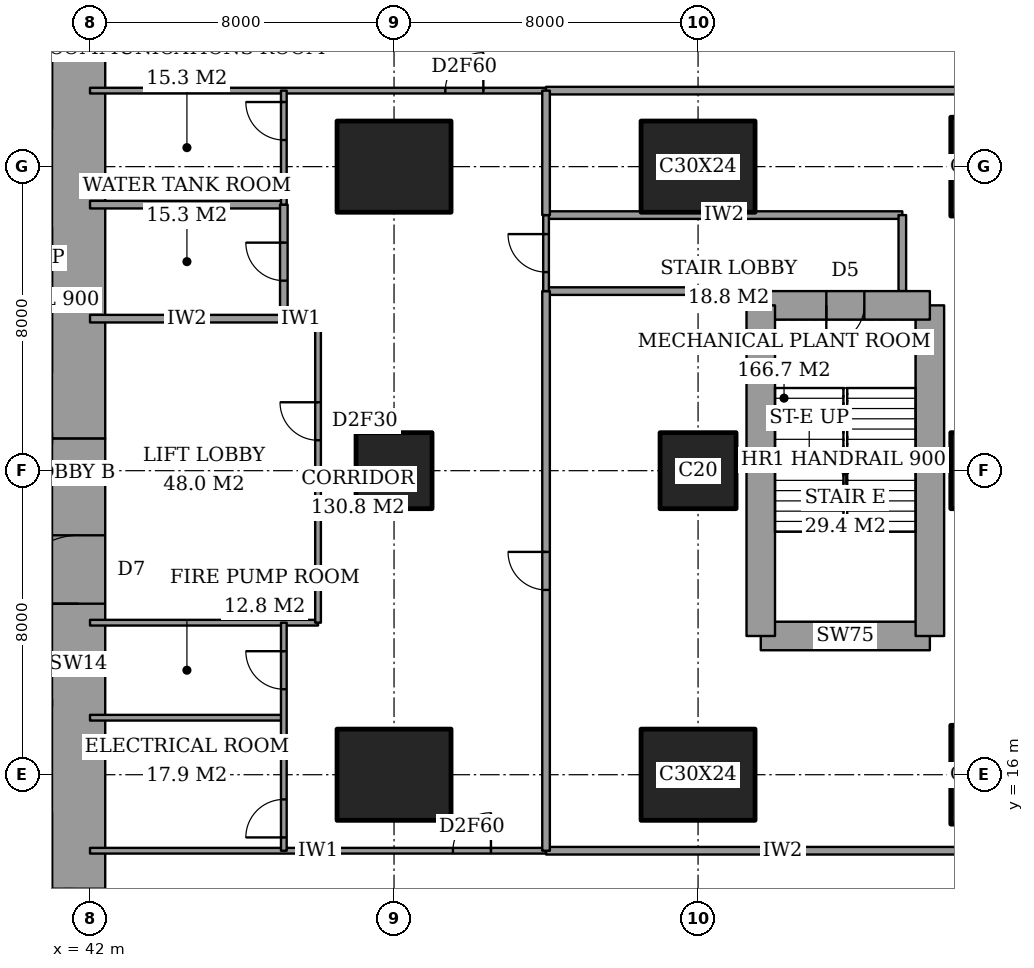
"""IFC4 building model, lengths in metres.
Left out: names, types, materials, properties, quantities, classifications, styles, units other than length and angle.
Written with IfcOpenShell. Run it as: python <this file> out.ifc"""

import sys

from ifc_helpers import new_model, si_unit, direction, frame, frame_2d, origin, origin_2d, place, context, subcontext, project, spatial, rectangle, extrude, element, fill, save


model = new_model("IFC4")
c1 = context("Model", 3, precision=1e-05, world=origin(), true_north=direction((0.0, 1.0)))
c2 = subcontext(c1, "Body", "Model", "MODEL_VIEW")
j1 = project(units=[si_unit("LENGTHUNIT", "METRE"), si_unit("PLANEANGLEUNIT", "RADIAN")], contexts=[c1])
p1 = place(None, origin())
s1 = spatial("IfcSite", under=j1, at=p1, CompositionType="ELEMENT")
p2 = place(p1, origin())
s2 = spatial("IfcBuilding", under=s1, at=p2, CompositionType="ELEMENT")
p3 = place(p2, frame((0.0, 0.0, 90.8)))
s3 = spatial("IfcBuildingStorey", under=s2, at=p3, CompositionType="ELEMENT", Elevation=90.8)
p4 = place(p3, frame((50.0, 16.0, 0.0), z_axis=(0.0, 0.0, 1.0), x_axis=(1.0, 0.0, 0.0)))
e1 = element("IfcColumn", 1, at=p4, inside=s3, PredefinedType="COLUMN", context=c2, shape_type="SweptSolid", body=[
    extrude(rectangle(XDim=3.0, YDim=2.4, at=origin_2d()), origin(), (0.0, 0.0, 1.0), 5.4),
])
p5 = place(p3, frame((50.0, 24.0, 0.0), z_axis=(0.0, 0.0, 1.0), x_axis=(1.0, 0.0, 0.0)))
e2 = element("IfcColumn", 2, at=p5, inside=s3, PredefinedType="COLUMN", context=c2, shape_type="SweptSolid", body=[
    extrude(rectangle(XDim=2.0, YDim=2.0, at=origin_2d()), origin(), (0.0, 0.0, 1.0), 5.4),
])
for number, where, z_axis, x_axis in (
    (3, (50.0, 32.0, 0.0), (0.0, 0.0, 1.0), (1.0, 0.0, 0.0)),
    (4, (58.0, 16.0, 0.0), (0.0, 0.0, 1.0), (1.0, 0.0, 0.0)),
):
    element("IfcColumn", number, at=place(p3, frame(where, z_axis=z_axis, x_axis=x_axis)), inside=s3, PredefinedType="COLUMN", context=c2, shape_type="SweptSolid", body=[
        extrude(rectangle(XDim=3.0, YDim=2.4, at=origin_2d()), origin(), (0.0, 0.0, 1.0), 5.4),
    ])
p6 = place(p3, frame((58.0, 24.0, 0.0), z_axis=(0.0, 0.0, 1.0), x_axis=(1.0, 0.0, 0.0)))
e5 = element("IfcColumn", 5, at=p6, inside=s3, PredefinedType="COLUMN", context=c2, shape_type="SweptSolid", body=[
    extrude(rectangle(XDim=2.0, YDim=2.0, at=origin_2d()), origin(), (0.0, 0.0, 1.0), 5.4),
])
p7 = place(p3, frame((58.0, 32.0, 0.0), z_axis=(0.0, 0.0, 1.0), x_axis=(1.0, 0.0, 0.0)))
e6 = element("IfcColumn", 6, at=p7, inside=s3, PredefinedType="COLUMN", context=c2, shape_type="SweptSolid", body=[
    extrude(rectangle(XDim=3.0, YDim=2.4, at=origin_2d()), origin(), (0.0, 0.0, 1.0), 5.4),
])
p8 = place(p3, frame((65.65, 16.0, 0.0), z_axis=(0.0, 0.0, 1.0), x_axis=(0.0, 1.0, 0.0)))
e7 = element("IfcColumn", 7, at=p8, inside=s3, PredefinedType="COLUMN", context=c2, shape_type="SweptSolid", body=[
    extrude(rectangle(XDim=2.6, YDim=2.0, at=origin_2d()), origin(), (0.0, 0.0, 1.0), 5.4),
])
p9 = place(p3, frame((65.65, 24.0, 0.0), z_axis=(0.0, 0.0, 1.0), x_axis=(1.0, 0.0, 0.0)))
e8 = element("IfcColumn", 8, at=p9, inside=s3, PredefinedType="COLUMN", context=c2, shape_type="SweptSolid", body=[
    extrude(rectangle(XDim=2.0, YDim=2.0, at=origin_2d()), origin(), (0.0, 0.0, 1.0), 5.4),
])
p10 = place(p3, frame((65.65, 32.0, 0.0), z_axis=(0.0, 0.0, 1.0), x_axis=(0.0, 1.0, 0.0)))
e9 = element("IfcColumn", 9, at=p10, inside=s3, PredefinedType="COLUMN", context=c2, shape_type="SweptSolid", body=[
    extrude(rectangle(XDim=2.6, YDim=2.0, at=origin_2d()), origin(), (0.0, 0.0, 1.0), 5.4),
])
p11 = place(p3, frame((41.7, 13.0, 0.0), z_axis=(0.0, 0.0, 1.0), x_axis=(0.0, 1.0, 0.0)))
e10 = element("IfcWall", 10, at=p11, inside=s3, PredefinedType="SHEAR", context=c2, shape_type="SweptSolid", body=[
    extrude(rectangle(XDim=11.85, YDim=1.4, at=frame_2d((5.925, 0.0))), origin(), (0.0, 0.0, 1.0), 5.4),
])
p12 = place(p11, frame((7.5, 0.0, 0.0)))
e11 = element("IfcOpeningElement", 11, at=p12, cuts=e10, PredefinedType="OPENING", context=c2, shape_type="SweptSolid", body=[
    extrude(rectangle(XDim=1.8, YDim=2.4, at=frame_2d((0.9, 1.2))), frame((0.0, 0.71, 0.0), z_axis=(0.0, -1.0, 0.0), x_axis=(1.0, 0.0, 0.0)), (0.0, 0.0, 1.0), 1.42),
])
p13 = place(p3, frame((41.7, 24.85, 0.0), z_axis=(0.0, 0.0, 1.0), x_axis=(0.0, 1.0, 0.0)))
e12 = element("IfcWall", 12, at=p13, inside=s3, PredefinedType="SHEAR", context=c2, shape_type="SweptSolid", body=[
    extrude(rectangle(XDim=10.15, YDim=1.4, at=frame_2d((5.075, 0.0))), origin(), (0.0, 0.0, 1.0), 5.4),
])
p14 = place(p3, frame((59.65, 19.65, 0.0), z_axis=(0.0, 0.0, 1.0), x_axis=(1.0, 0.0, 0.0)))
e13 = element("IfcWall", 13, at=p14, inside=s3, PredefinedType="SHEAR", context=c2, shape_type="SweptSolid", body=[
    extrude(rectangle(XDim=4.45, YDim=0.75, at=frame_2d((2.225, 0.0))), origin(), (0.0, 0.0, 1.0), 5.4),
])
p15 = place(p3, frame((64.1, 19.65, 0.0), z_axis=(0.0, 0.0, 1.0), x_axis=(0.0, 1.0, 0.0)))
e14 = element("IfcWall", 14, at=p15, inside=s3, PredefinedType="SHEAR", context=c2, shape_type="SweptSolid", body=[
    extrude(rectangle(XDim=8.7, YDim=0.75, at=frame_2d((4.35, 0.0))), origin(), (0.0, 0.0, 1.0), 5.4),
])
p16 = place(p3, frame((64.1, 28.35, 0.0), z_axis=(0.0, 0.0, 1.0), x_axis=(-1.0, 0.0, 0.0)))
e15 = element("IfcWall", 15, at=p16, inside=s3, PredefinedType="SHEAR", context=c2, shape_type="SweptSolid", body=[
    extrude(rectangle(XDim=4.45, YDim=0.75, at=frame_2d((2.225, 0.0))), origin(), (0.0, 0.0, 1.0), 5.4),
])
p17 = place(p16, frame((1.725, 0.0, 0.0)))
e16 = element("IfcOpeningElement", 16, at=p17, cuts=e15, PredefinedType="OPENING", context=c2, shape_type="SweptSolid", body=[
    extrude(rectangle(XDim=1.0, YDim=2.1, at=frame_2d((0.5, 1.05))), frame((0.0, 0.385, 0.0), z_axis=(0.0, -1.0, 0.0), x_axis=(1.0, 0.0, 0.0)), (0.0, 0.0, 1.0), 0.77),
])
p18 = place(p3, frame((59.65, 28.35, 0.0), z_axis=(0.0, 0.0, 1.0), x_axis=(0.0, -1.0, 0.0)))
e17 = element("IfcWall", 17, at=p18, inside=s3, PredefinedType="SHEAR", context=c2, shape_type="SweptSolid", body=[
    extrude(rectangle(XDim=8.7, YDim=0.75, at=frame_2d((4.35, 0.0))), origin(), (0.0, 0.0, 1.0), 5.4),
])
p19 = place(p3, frame((54.0, 14.0, 0.0), z_axis=(0.0, 0.0, 1.0), x_axis=(1.0, 0.0, 0.0)))
e18 = element("IfcWall", 18, at=p19, inside=s3, PredefinedType="PARTITIONING", context=c2, shape_type="SweptSolid", body=[
    extrude(rectangle(XDim=12.45, YDim=0.2, at=frame_2d((6.225, 0.0))), origin(), (0.0, 0.0, 1.0), 5.15),
])
p20 = place(p3, frame((42.0, 14.0, 0.0), z_axis=(0.0, 0.0, 1.0), x_axis=(1.0, 0.0, 0.0)))
e19 = element("IfcWall", 19, at=p20, inside=s3, PredefinedType="PARTITIONING", context=c2, shape_type="SweptSolid", body=[
    extrude(rectangle(XDim=12.0, YDim=0.15, at=frame_2d((6.0, 0.0))), origin(), (0.0, 0.0, 1.0), 5.15),
])
p21 = place(p20, frame((9.55, 0.0, 0.0)))
e20 = element("IfcOpeningElement", 20, at=p21, cuts=e19, PredefinedType="OPENING", context=c2, shape_type="SweptSolid", body=[
    extrude(rectangle(XDim=1.0, YDim=2.1, at=frame_2d((0.5, 1.05))), frame((0.0, 0.085, 0.0), z_axis=(0.0, -1.0, 0.0), x_axis=(1.0, 0.0, 0.0)), (0.0, 0.0, 1.0), 0.17),
])
p22 = place(p3, frame((42.0, 17.5, 0.0), z_axis=(0.0, 0.0, 1.0), x_axis=(1.0, 0.0, 0.0)))
e21 = element("IfcWall", 21, at=p22, inside=s3, PredefinedType="PARTITIONING", context=c2, shape_type="SweptSolid", body=[
    extrude(rectangle(XDim=5.1, YDim=0.15, at=frame_2d((2.55, 0.0))), origin(), (0.0, 0.0, 1.0), 5.15),
])
p23 = place(p3, frame((42.0, 20.0, 0.0), z_axis=(0.0, 0.0, 1.0), x_axis=(1.0, 0.0, 0.0)))
e22 = element("IfcWall", 22, at=p23, inside=s3, PredefinedType="PARTITIONING", context=c2, shape_type="SweptSolid", body=[
    extrude(rectangle(XDim=6.0, YDim=0.15, at=frame_2d((3.0, 0.0))), origin(), (0.0, 0.0, 1.0), 5.15),
])
p24 = place(p3, frame((42.0, 28.0, 0.0), z_axis=(0.0, 0.0, 1.0), x_axis=(1.0, 0.0, 0.0)))
e23 = element("IfcWall", 23, at=p24, inside=s3, PredefinedType="PARTITIONING", context=c2, shape_type="SweptSolid", body=[
    extrude(rectangle(XDim=5.1, YDim=0.2, at=frame_2d((2.55, 0.0))), origin(), (0.0, 0.0, 1.0), 5.15),
])
p25 = place(p3, frame((47.1, 28.0, 0.0), z_axis=(0.0, 0.0, 1.0), x_axis=(1.0, 0.0, 0.0)))
e24 = element("IfcWall", 24, at=p25, inside=s3, PredefinedType="PARTITIONING", context=c2, shape_type="SweptSolid", body=[
    extrude(rectangle(XDim=0.9, YDim=0.15, at=frame_2d((0.45, 0.0))), origin(), (0.0, 0.0, 1.0), 5.15),
])
p26 = place(p3, frame((54.0, 28.725, 0.0), z_axis=(0.0, 0.0, 1.0), x_axis=(1.0, 0.0, 0.0)))
e25 = element("IfcWall", 25, at=p26, inside=s3, PredefinedType="PARTITIONING", context=c2, shape_type="SweptSolid", body=[
    extrude(rectangle(XDim=5.65, YDim=0.2, at=frame_2d((2.825, 0.0))), origin(), (0.0, 0.0, 1.0), 5.15),
])
p27 = place(p3, frame((54.0, 30.725, 0.0), z_axis=(0.0, 0.0, 1.0), x_axis=(1.0, 0.0, 0.0)))
e26 = element("IfcWall", 26, at=p27, inside=s3, PredefinedType="PARTITIONING", context=c2, shape_type="SweptSolid", body=[
    extrude(rectangle(XDim=9.375, YDim=0.2, at=frame_2d((4.688, 0.0))), origin(), (0.0, 0.0, 1.0), 5.15),
])
p28 = place(p3, frame((42.0, 31.0, 0.0), z_axis=(0.0, 0.0, 1.0), x_axis=(1.0, 0.0, 0.0)))
e27 = element("IfcWall", 27, at=p28, inside=s3, PredefinedType="PARTITIONING", context=c2, shape_type="SweptSolid", body=[
    extrude(rectangle(XDim=5.1, YDim=0.2, at=frame_2d((2.55, 0.0))), origin(), (0.0, 0.0, 1.0), 5.15),
])
p29 = place(p3, frame((54.0, 34.0, 0.0), z_axis=(0.0, 0.0, 1.0), x_axis=(1.0, 0.0, 0.0)))
e28 = element("IfcWall", 28, at=p29, inside=s3, PredefinedType="PARTITIONING", context=c2, shape_type="SweptSolid", body=[
    extrude(rectangle(XDim=12.45, YDim=0.2, at=frame_2d((6.225, 0.0))), origin(), (0.0, 0.0, 1.0), 5.15),
])
p30 = place(p3, frame((42.0, 34.0, 0.0), z_axis=(0.0, 0.0, 1.0), x_axis=(1.0, 0.0, 0.0)))
e29 = element("IfcWall", 29, at=p30, inside=s3, PredefinedType="PARTITIONING", context=c2, shape_type="SweptSolid", body=[
    extrude(rectangle(XDim=12.0, YDim=0.15, at=frame_2d((6.0, 0.0))), origin(), (0.0, 0.0, 1.0), 5.15),
])
p31 = place(p30, frame((9.35, 0.0, 0.0)))
e30 = element("IfcOpeningElement", 30, at=p31, cuts=e29, PredefinedType="OPENING", context=c2, shape_type="SweptSolid", body=[
    extrude(rectangle(XDim=1.0, YDim=2.1, at=frame_2d((0.5, 1.05))), frame((0.0, 0.085, 0.0), z_axis=(0.0, -1.0, 0.0), x_axis=(1.0, 0.0, 0.0)), (0.0, 0.0, 1.0), 0.17),
])
p32 = place(p3, frame((47.1, 28.0, 0.0), z_axis=(0.0, 0.0, 1.0), x_axis=(0.0, 1.0, 0.0)))
e31 = element("IfcWall", 31, at=p32, inside=s3, PredefinedType="PARTITIONING", context=c2, shape_type="SweptSolid", body=[
    extrude(rectangle(XDim=3.0, YDim=0.2, at=frame_2d((1.5, 0.0))), origin(), (0.0, 0.0, 1.0), 5.15),
])
p33 = place(p32, frame((1.0, 0.0, 0.0)))
e32 = element("IfcOpeningElement", 32, at=p33, cuts=e31, PredefinedType="OPENING", context=c2, shape_type="SweptSolid", body=[
    extrude(rectangle(XDim=1.0, YDim=2.1, at=frame_2d((0.5, 1.05))), frame((0.0, 0.11, 0.0), z_axis=(0.0, -1.0, 0.0), x_axis=(1.0, 0.0, 0.0)), (0.0, 0.0, 1.0), 0.22),
])
p34 = place(p3, frame((47.1, 14.0, 0.0), z_axis=(0.0, 0.0, 1.0), x_axis=(0.0, 1.0, 0.0)))
e33 = element("IfcWall", 33, at=p34, inside=s3, PredefinedType="PARTITIONING", context=c2, shape_type="SweptSolid", body=[
    extrude(rectangle(XDim=6.0, YDim=0.15, at=frame_2d((3.0, 0.0))), origin(), (0.0, 0.0, 1.0), 5.15),
])
p35 = place(p34, frame((0.35, 0.0, 0.0)))
e34 = element("IfcOpeningElement", 34, at=p35, cuts=e33, PredefinedType="OPENING", context=c2, shape_type="SweptSolid", body=[
    extrude(rectangle(XDim=1.0, YDim=2.1, at=frame_2d((0.5, 1.05))), frame((0.0, 0.085, 0.0), z_axis=(0.0, -1.0, 0.0), x_axis=(1.0, 0.0, 0.0)), (0.0, 0.0, 1.0), 0.17),
])
p36 = place(p34, frame((4.25, 0.0, 0.0)))
e35 = element("IfcOpeningElement", 35, at=p36, cuts=e33, PredefinedType="OPENING", context=c2, shape_type="SweptSolid", body=[
    extrude(rectangle(XDim=1.0, YDim=2.1, at=frame_2d((0.5, 1.05))), frame((0.0, 0.085, 0.0), z_axis=(0.0, -1.0, 0.0), x_axis=(1.0, 0.0, 0.0)), (0.0, 0.0, 1.0), 0.17),
])
p37 = place(p3, frame((47.1, 31.0, 0.0), z_axis=(0.0, 0.0, 1.0), x_axis=(0.0, 1.0, 0.0)))
e36 = element("IfcWall", 36, at=p37, inside=s3, PredefinedType="PARTITIONING", context=c2, shape_type="SweptSolid", body=[
    extrude(rectangle(XDim=3.0, YDim=0.15, at=frame_2d((1.5, 0.0))), origin(), (0.0, 0.0, 1.0), 5.15),
])
p38 = place(p37, frame((1.7, 0.0, 0.0)))
e37 = element("IfcOpeningElement", 37, at=p38, cuts=e36, PredefinedType="OPENING", context=c2, shape_type="SweptSolid", body=[
    extrude(rectangle(XDim=1.0, YDim=2.1, at=frame_2d((0.5, 1.05))), frame((0.0, 0.085, 0.0), z_axis=(0.0, -1.0, 0.0), x_axis=(1.0, 0.0, 0.0)), (0.0, 0.0, 1.0), 0.17),
])
p39 = place(p3, frame((48.0, 20.0, 0.0), z_axis=(0.0, 0.0, 1.0), x_axis=(0.0, 1.0, 0.0)))
e38 = element("IfcWall", 38, at=p39, inside=s3, PredefinedType="PARTITIONING", context=c2, shape_type="SweptSolid", body=[
    extrude(rectangle(XDim=8.0, YDim=0.15, at=frame_2d((4.0, 0.0))), origin(), (0.0, 0.0, 1.0), 5.15),
])
p40 = place(p39, frame((4.8, 0.0, 0.0)))
e39 = element("IfcOpeningElement", 39, at=p40, cuts=e38, PredefinedType="OPENING", context=c2, shape_type="SweptSolid", body=[
    extrude(rectangle(XDim=1.0, YDim=2.1, at=frame_2d((0.5, 1.05))), frame((0.0, 0.085, 0.0), z_axis=(0.0, -1.0, 0.0), x_axis=(1.0, 0.0, 0.0)), (0.0, 0.0, 1.0), 0.17),
])
p41 = place(p3, frame((54.0, 14.0, 0.0), z_axis=(0.0, 0.0, 1.0), x_axis=(0.0, 1.0, 0.0)))
e40 = element("IfcWall", 40, at=p41, inside=s3, PredefinedType="PARTITIONING", context=c2, shape_type="SweptSolid", body=[
    extrude(rectangle(XDim=14.725, YDim=0.2, at=frame_2d((7.363, 0.0))), origin(), (0.0, 0.0, 1.0), 5.15),
])
p42 = place(p41, frame((6.863, 0.0, 0.0)))
e41 = element("IfcOpeningElement", 41, at=p42, cuts=e40, PredefinedType="OPENING", context=c2, shape_type="SweptSolid", body=[
    extrude(rectangle(XDim=1.0, YDim=2.1, at=frame_2d((0.5, 1.05))), frame((0.0, 0.11, 0.0), z_axis=(0.0, -1.0, 0.0), x_axis=(1.0, 0.0, 0.0)), (0.0, 0.0, 1.0), 0.22),
])
p43 = place(p3, frame((54.0, 30.725, 0.0), z_axis=(0.0, 0.0, 1.0), x_axis=(0.0, 1.0, 0.0)))
e42 = element("IfcWall", 42, at=p43, inside=s3, PredefinedType="PARTITIONING", context=c2, shape_type="SweptSolid", body=[
    extrude(rectangle(XDim=3.275, YDim=0.2, at=frame_2d((1.637, 0.0))), origin(), (0.0, 0.0, 1.0), 5.15),
])
p44 = place(p3, frame((54.0, 28.725, 0.0), z_axis=(0.0, 0.0, 1.0), x_axis=(0.0, 1.0, 0.0)))
e43 = element("IfcWall", 43, at=p44, inside=s3, PredefinedType="PARTITIONING", context=c2, shape_type="SweptSolid", body=[
    extrude(rectangle(XDim=2.0, YDim=0.15, at=frame_2d((1.0, 0.0))), origin(), (0.0, 0.0, 1.0), 5.15),
])
p45 = place(p44, frame((0.5, 0.0, 0.0)))
e44 = element("IfcOpeningElement", 44, at=p45, cuts=e43, PredefinedType="OPENING", context=c2, shape_type="SweptSolid", body=[
    extrude(rectangle(XDim=1.0, YDim=2.1, at=frame_2d((0.5, 1.05))), frame((0.0, 0.085, 0.0), z_axis=(0.0, -1.0, 0.0), x_axis=(1.0, 0.0, 0.0)), (0.0, 0.0, 1.0), 0.17),
])
p46 = place(p3, frame((63.375, 28.725, 0.0), z_axis=(0.0, 0.0, 1.0), x_axis=(0.0, 1.0, 0.0)))
e45 = element("IfcWall", 45, at=p46, inside=s3, PredefinedType="PARTITIONING", context=c2, shape_type="SweptSolid", body=[
    extrude(rectangle(XDim=2.0, YDim=0.2, at=frame_2d((1.0, 0.0))), origin(), (0.0, 0.0, 1.0), 5.15),
])
p47 = place(p3, frame((28.3, 17.9, 0.0), z_axis=(0.0, 0.0, 1.0), x_axis=(1.0, 0.0, 0.0)))
e46 = element("IfcWall", 46, at=p47, inside=s3, PredefinedType="PARTITIONING", context=c2, shape_type="SweptSolid", body=[
    extrude(rectangle(XDim=12.7, YDim=0.2, at=frame_2d((6.35, 0.0))), origin(), (0.0, 0.0, 1.0), 5.4),
])
p48 = place(p47, frame((0.95, 0.0, 0.0)))
e47 = element("IfcOpeningElement", 47, at=p48, cuts=e46, PredefinedType="OPENING", context=c2, shape_type="SweptSolid", body=[
    extrude(rectangle(XDim=1.1, YDim=2.1, at=frame_2d((0.55, 1.05))), frame((0.0, 0.11, 0.0), z_axis=(0.0, -1.0, 0.0), x_axis=(1.0, 0.0, 0.0)), (0.0, 0.0, 1.0), 0.22),
])
p49 = place(p47, frame((4.15, 0.0, 0.0)))
e48 = element("IfcOpeningElement", 48, at=p49, cuts=e46, PredefinedType="OPENING", context=c2, shape_type="SweptSolid", body=[
    extrude(rectangle(XDim=1.1, YDim=2.1, at=frame_2d((0.55, 1.05))), frame((0.0, 0.11, 0.0), z_axis=(0.0, -1.0, 0.0), x_axis=(1.0, 0.0, 0.0)), (0.0, 0.0, 1.0), 0.22),
])
p50 = place(p47, frame((7.35, 0.0, 0.0)))
e49 = element("IfcOpeningElement", 49, at=p50, cuts=e46, PredefinedType="OPENING", context=c2, shape_type="SweptSolid", body=[
    extrude(rectangle(XDim=1.1, YDim=2.1, at=frame_2d((0.55, 1.05))), frame((0.0, 0.11, 0.0), z_axis=(0.0, -1.0, 0.0), x_axis=(1.0, 0.0, 0.0)), (0.0, 0.0, 1.0), 0.22),
])
p51 = place(p47, frame((10.6, 0.0, 0.0)))
e50 = element("IfcOpeningElement", 50, at=p51, cuts=e46, PredefinedType="OPENING", context=c2, shape_type="SweptSolid", body=[
    extrude(rectangle(XDim=1.2, YDim=2.1, at=frame_2d((0.6, 1.05))), frame((0.0, 0.11, 0.0), z_axis=(0.0, -1.0, 0.0), x_axis=(1.0, 0.0, 0.0)), (0.0, 0.0, 1.0), 0.22),
])
p52 = place(p21, origin())
e51 = element("IfcDoor", 51, at=p52, inside=s3, OperationType="SINGLE_SWING_LEFT", PredefinedType="DOOR", context=c2, shape_type="SweptSolid", body=[
    extrude(rectangle(XDim=1.0, YDim=2.1, at=frame_2d((0.5, 1.05))), frame((0.0, 0.025, 0.0), z_axis=(0.0, -1.0, 0.0), x_axis=(1.0, 0.0, 0.0)), (0.0, 0.0, 1.0), 0.05),
])
fill(e20, e51)
p53 = place(p42, origin())
e52 = element("IfcDoor", 52, at=p53, inside=s3, OperationType="SINGLE_SWING_LEFT", PredefinedType="DOOR", context=c2, shape_type="SweptSolid", body=[
    extrude(rectangle(XDim=1.0, YDim=2.1, at=frame_2d((0.5, 1.05))), frame((0.0, 0.025, 0.0), z_axis=(0.0, -1.0, 0.0), x_axis=(1.0, 0.0, 0.0)), (0.0, 0.0, 1.0), 0.05),
])
fill(e41, e52)
p54 = place(p31, origin())
e53 = element("IfcDoor", 53, at=p54, inside=s3, OperationType="SINGLE_SWING_LEFT", PredefinedType="DOOR", context=c2, shape_type="SweptSolid", body=[
    extrude(rectangle(XDim=1.0, YDim=2.1, at=frame_2d((0.5, 1.05))), frame((0.0, 0.025, 0.0), z_axis=(0.0, -1.0, 0.0), x_axis=(1.0, 0.0, 0.0)), (0.0, 0.0, 1.0), 0.05),
])
fill(e30, e53)
p55 = place(p40, origin())
e54 = element("IfcDoor", 54, at=p55, inside=s3, OperationType="SINGLE_SWING_LEFT", PredefinedType="DOOR", context=c2, shape_type="SweptSolid", body=[
    extrude(rectangle(XDim=1.0, YDim=2.1, at=frame_2d((0.5, 1.05))), frame((0.0, 0.025, 0.0), z_axis=(0.0, -1.0, 0.0), x_axis=(1.0, 0.0, 0.0)), (0.0, 0.0, 1.0), 0.05),
])
fill(e39, e54)
p56 = place(p35, origin())
e55 = element("IfcDoor", 55, at=p56, inside=s3, OperationType="SINGLE_SWING_RIGHT", PredefinedType="DOOR", context=c2, shape_type="SweptSolid", body=[
    extrude(rectangle(XDim=1.0, YDim=2.1, at=frame_2d((0.5, 1.05))), frame((0.0, 0.025, 0.0), z_axis=(0.0, -1.0, 0.0), x_axis=(1.0, 0.0, 0.0)), (0.0, 0.0, 1.0), 0.05),
])
fill(e34, e55)
p57 = place(p36, origin())
e56 = element("IfcDoor", 56, at=p57, inside=s3, OperationType="SINGLE_SWING_LEFT", PredefinedType="DOOR", context=c2, shape_type="SweptSolid", body=[
    extrude(rectangle(XDim=1.0, YDim=2.1, at=frame_2d((0.5, 1.05))), frame((0.0, 0.025, 0.0), z_axis=(0.0, -1.0, 0.0), x_axis=(1.0, 0.0, 0.0)), (0.0, 0.0, 1.0), 0.05),
])
fill(e35, e56)
p58 = place(p33, origin())
e57 = element("IfcDoor", 57, at=p58, inside=s3, OperationType="SINGLE_SWING_LEFT", PredefinedType="DOOR", context=c2, shape_type="SweptSolid", body=[
    extrude(rectangle(XDim=1.0, YDim=2.1, at=frame_2d((0.5, 1.05))), frame((0.0, 0.025, 0.0), z_axis=(0.0, -1.0, 0.0), x_axis=(1.0, 0.0, 0.0)), (0.0, 0.0, 1.0), 0.05),
])
fill(e32, e57)
p59 = place(p38, origin())
e58 = element("IfcDoor", 58, at=p59, inside=s3, OperationType="SINGLE_SWING_LEFT", PredefinedType="DOOR", context=c2, shape_type="SweptSolid", body=[
    extrude(rectangle(XDim=1.0, YDim=2.1, at=frame_2d((0.5, 1.05))), frame((0.0, 0.025, 0.0), z_axis=(0.0, -1.0, 0.0), x_axis=(1.0, 0.0, 0.0)), (0.0, 0.0, 1.0), 0.05),
])
fill(e37, e58)
p60 = place(p45, origin())
e59 = element("IfcDoor", 59, at=p60, inside=s3, OperationType="SINGLE_SWING_LEFT", PredefinedType="DOOR", context=c2, shape_type="SweptSolid", body=[
    extrude(rectangle(XDim=1.0, YDim=2.1, at=frame_2d((0.5, 1.05))), frame((0.0, 0.025, 0.0), z_axis=(0.0, -1.0, 0.0), x_axis=(1.0, 0.0, 0.0)), (0.0, 0.0, 1.0), 0.05),
])
fill(e44, e59)
p61 = place(p12, origin())
e60 = element("IfcDoor", 60, at=p61, inside=s3, OperationType="DOUBLE_DOOR_DOUBLE_SWING", PredefinedType="DOOR", context=c2, shape_type="SweptSolid", body=[
    extrude(rectangle(XDim=1.8, YDim=2.4, at=frame_2d((0.9, 1.2))), frame((0.0, 0.025, 0.0), z_axis=(0.0, -1.0, 0.0), x_axis=(1.0, 0.0, 0.0)), (0.0, 0.0, 1.0), 0.05),
])
fill(e11, e60)
p62 = place(p17, origin())
e61 = element("IfcDoor", 61, at=p62, inside=s3, OperationType="SINGLE_SWING_LEFT", PredefinedType="DOOR", context=c2, shape_type="SweptSolid", body=[
    extrude(rectangle(XDim=1.0, YDim=2.1, at=frame_2d((0.5, 1.05))), frame((0.0, 0.025, 0.0), z_axis=(0.0, -1.0, 0.0), x_axis=(1.0, 0.0, 0.0)), (0.0, 0.0, 1.0), 0.05),
])
fill(e16, e61)
save(model, sys.argv[1])
